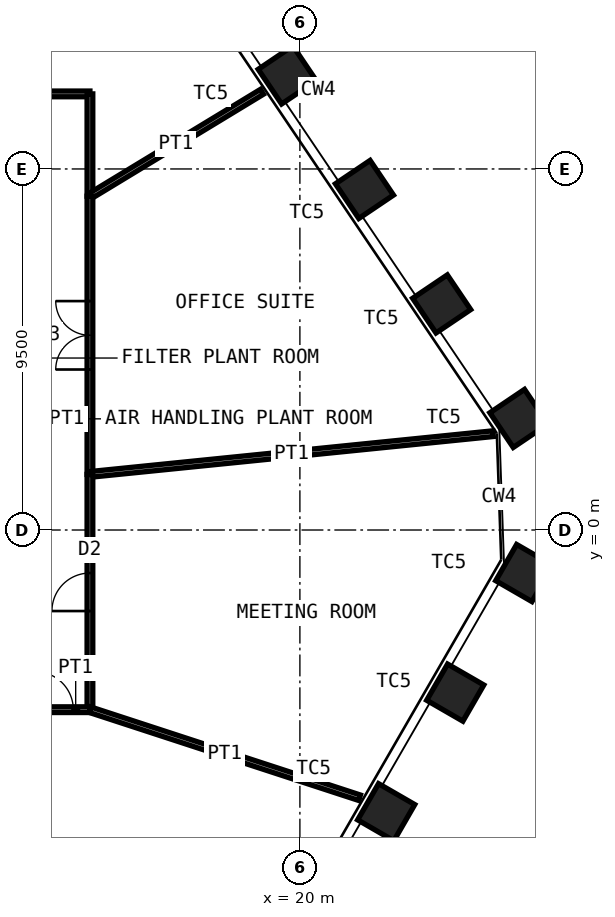
"""IFC4 building model, lengths in metres.
Left out: names, types, materials, properties, quantities, classifications, styles, units other than length and angle.
Written with IfcOpenShell. Run it as: python <this file> out.ifc"""

import sys

from ifc_helpers import new_model, si_unit, direction, frame, frame_2d, origin, origin_2d, place, context, subcontext, project, spatial, rectangle, hollow_rectangle, extrude, element, fill, save


model = new_model("IFC4")
c1 = context("Model", 3, precision=1e-05, world=origin(), true_north=direction((0.0, 1.0)))
c2 = subcontext(c1, "Body", "Model", "MODEL_VIEW")
j1 = project(units=[si_unit("LENGTHUNIT", "METRE"), si_unit("PLANEANGLEUNIT", "RADIAN")], contexts=[c1])
p1 = place(None, origin())
s1 = spatial("IfcSite", under=j1, at=p1, CompositionType="ELEMENT")
p2 = place(p1, origin())
s2 = spatial("IfcBuilding", under=s1, at=p2, CompositionType="ELEMENT")
p3 = place(p2, frame((0.0, 0.0, 197.2)))
s3 = spatial("IfcBuildingStorey", under=s2, at=p3, CompositionType="ELEMENT", Elevation=197.2)
for number, where, z_axis, x_axis in (
    (1, (19.667, 11.973, 0.0), (0.0, 0.0, 1.0), (-0.559, 0.829, 0.0)),
    (2, (21.699, 8.961, 0.0), (0.0, 0.0, 1.0), (-0.559, 0.829, 0.0)),
    (3, (23.731, 5.948, 0.0), (0.0, 0.0, 1.0), (-0.559, 0.829, 0.0)),
    (4, (25.762, 2.936, 0.0), (0.0, 0.0, 1.0), (-0.559, 0.829, 0.0)),
    (5, (25.905, -1.132, 0.0), (0.0, 0.0, 1.0), (0.5, 0.866, 0.0)),
    (6, (24.088, -4.279, 0.0), (0.0, 0.0, 1.0), (0.5, 0.866, 0.0)),
    (7, (22.271, -7.426, 0.0), (0.0, 0.0, 1.0), (0.5, 0.866, 0.0)),
):
    element("IfcColumn", number, at=place(p3, frame(where, z_axis=z_axis, x_axis=x_axis)), inside=s3, PredefinedType="COLUMN", context=c2, shape_type="SweptSolid", body=[
        extrude(hollow_rectangle(XDim=1.1, YDim=1.1, WallThickness=0.07, at=origin_2d()), origin(), (0.0, 0.0, 1.0), 4.2),
    ])
p4 = place(p3, frame((5.058, 11.475, 0.0), z_axis=(0.0, 0.0, 1.0), x_axis=(1.0, 0.0, 0.0)))
e8 = element("IfcWall", 8, at=p4, inside=s3, PredefinedType="PARTITIONING", context=c2, shape_type="SweptSolid", body=[
    extrude(rectangle(XDim=9.417, YDim=0.15, at=frame_2d((4.708, 0.0))), origin(), (0.0, 0.0, 1.0), 4.03),
])
p5 = place(p4, frame((3.809, 0.0, 0.0)))
e9 = element("IfcOpeningElement", 9, at=p5, cuts=e8, PredefinedType="OPENING", context=c2, shape_type="SweptSolid", body=[
    extrude(rectangle(XDim=1.8, YDim=2.4, at=frame_2d((0.9, 1.2))), frame((0.0, 0.085, 0.0), z_axis=(0.0, -1.0, 0.0), x_axis=(1.0, 0.0, 0.0)), (0.0, 0.0, 1.0), 0.17),
])
p6 = place(p3, frame((14.475, 11.475, 0.0), z_axis=(0.0, 0.0, 1.0), x_axis=(0.0, -1.0, 0.0)))
e10 = element("IfcWall", 10, at=p6, inside=s3, PredefinedType="PARTITIONING", context=c2, shape_type="SweptSolid", body=[
    extrude(rectangle(XDim=2.692, YDim=0.15, at=frame_2d((1.346, 0.0))), origin(), (0.0, 0.0, 1.0), 4.03),
])
p7 = place(p3, frame((19.001, 11.53, 0.0), z_axis=(0.0, 0.0, 1.0), x_axis=(-0.854906581035, -0.518781975114, 0.0)))
e11 = element("IfcWall", 11, at=p7, inside=s3, PredefinedType="PARTITIONING", context=c2, shape_type="SweptSolid", body=[
    extrude(rectangle(XDim=5.294, YDim=0.15, at=frame_2d((2.647, 0.0))), origin(), (0.0, 0.0, 1.0), 3.43),
])
p8 = place(p3, frame((14.475, 8.783, 0.0), z_axis=(0.0, 0.0, 1.0), x_axis=(0.0, -1.0, 0.0)))
e12 = element("IfcWall", 12, at=p8, inside=s3, PredefinedType="PARTITIONING", context=c2, shape_type="SweptSolid", body=[
    extrude(rectangle(XDim=7.321, YDim=0.15, at=frame_2d((3.66, 0.0))), origin(), (0.0, 0.0, 1.0), 4.03),
])
p9 = place(p8, frame((2.76, 0.0, 0.0)))
e13 = element("IfcOpeningElement", 13, at=p9, cuts=e12, PredefinedType="OPENING", context=c2, shape_type="SweptSolid", body=[
    extrude(rectangle(XDim=1.8, YDim=2.4, at=frame_2d((0.9, 1.2))), frame((0.0, 0.085, 0.0), z_axis=(0.0, -1.0, 0.0), x_axis=(1.0, 0.0, 0.0)), (0.0, 0.0, 1.0), 0.17),
])
p10 = place(p3, frame((25.083, 2.535, 0.0), z_axis=(0.0, 0.0, 1.0), x_axis=(-0.994932122767, -0.10054884925, 0.0)))
e14 = element("IfcWall", 14, at=p10, inside=s3, PredefinedType="PARTITIONING", context=c2, shape_type="SweptSolid", body=[
    extrude(rectangle(XDim=10.662, YDim=0.15, at=frame_2d((5.331, 0.0))), origin(), (0.0, 0.0, 1.0), 2.93),
])
p11 = place(p3, frame((14.475, 1.463, 0.0), z_axis=(0.0, 0.0, 1.0), x_axis=(0.0, -1.0, 0.0)))
e15 = element("IfcWall", 15, at=p11, inside=s3, PredefinedType="PARTITIONING", context=c2, shape_type="SweptSolid", body=[
    extrude(rectangle(XDim=6.19, YDim=0.15, at=frame_2d((3.095, 0.0))), origin(), (0.0, 0.0, 1.0), 4.03),
])
p12 = place(p11, frame((2.595, 0.0, 0.0)))
e16 = element("IfcOpeningElement", 16, at=p12, cuts=e15, PredefinedType="OPENING", context=c2, shape_type="SweptSolid", body=[
    extrude(rectangle(XDim=1.0, YDim=2.4, at=frame_2d((0.5, 1.2))), frame((0.0, 0.085, 0.0), z_axis=(0.0, -1.0, 0.0), x_axis=(1.0, 0.0, 0.0)), (0.0, 0.0, 1.0), 0.17),
])
p13 = place(p3, frame((21.57, -7.044, 0.0), z_axis=(0.0, 0.0, 1.0), x_axis=(-0.950585953502, 0.310461503258, 0.0)))
e17 = element("IfcWall", 17, at=p13, inside=s3, PredefinedType="PARTITIONING", context=c2, shape_type="SweptSolid", body=[
    extrude(rectangle(XDim=7.464, YDim=0.15, at=frame_2d((3.732, 0.0))), origin(), (0.0, 0.0, 1.0), 3.43),
])
p14 = place(p3, frame((14.475, -4.727, 0.0), z_axis=(0.0, 0.0, 1.0), x_axis=(-1.0, 0.0, 0.0)))
e18 = element("IfcWall", 18, at=p14, inside=s3, PredefinedType="PARTITIONING", context=c2, shape_type="SweptSolid", body=[
    extrude(rectangle(XDim=1.875, YDim=0.15, at=frame_2d((0.938, 0.0))), origin(), (0.0, 0.0, 1.0), 4.03),
])
p15 = place(p14, frame((0.438, 0.0, 0.0)))
e19 = element("IfcOpeningElement", 19, at=p15, cuts=e18, PredefinedType="OPENING", context=c2, shape_type="SweptSolid", body=[
    extrude(rectangle(XDim=1.0, YDim=2.4, at=frame_2d((0.5, 1.2))), frame((0.0, 0.085, 0.0), z_axis=(0.0, -1.0, 0.0), x_axis=(1.0, 0.0, 0.0)), (0.0, 0.0, 1.0), 0.17),
])
p16 = place(p9, origin())
e20 = element("IfcDoor", 20, at=p16, inside=s3, OperationType="DOUBLE_DOOR_DOUBLE_SWING", PredefinedType="DOOR", context=c2, shape_type="SweptSolid", body=[
    extrude(rectangle(XDim=1.8, YDim=2.4, at=frame_2d((0.9, 1.2))), frame((0.0, 0.025, 0.0), z_axis=(0.0, -1.0, 0.0), x_axis=(1.0, 0.0, 0.0)), (0.0, 0.0, 1.0), 0.05),
])
fill(e13, e20)
p17 = place(p12, origin())
e21 = element("IfcDoor", 21, at=p17, inside=s3, OperationType="SINGLE_SWING_RIGHT", PredefinedType="DOOR", context=c2, shape_type="SweptSolid", body=[
    extrude(rectangle(XDim=1.0, YDim=2.4, at=frame_2d((0.5, 1.2))), frame((0.0, 0.025, 0.0), z_axis=(0.0, -1.0, 0.0), x_axis=(1.0, 0.0, 0.0)), (0.0, 0.0, 1.0), 0.05),
])
fill(e16, e21)
p18 = place(p15, origin())
e22 = element("IfcDoor", 22, at=p18, inside=s3, OperationType="SINGLE_SWING_RIGHT", PredefinedType="DOOR", context=c2, shape_type="SweptSolid", body=[
    extrude(rectangle(XDim=1.0, YDim=2.4, at=frame_2d((0.5, 1.2))), frame((0.0, 0.025, 0.0), z_axis=(0.0, -1.0, 0.0), x_axis=(1.0, 0.0, 0.0)), (0.0, 0.0, 1.0), 0.05),
])
fill(e19, e22)
save(model, sys.argv[1])
